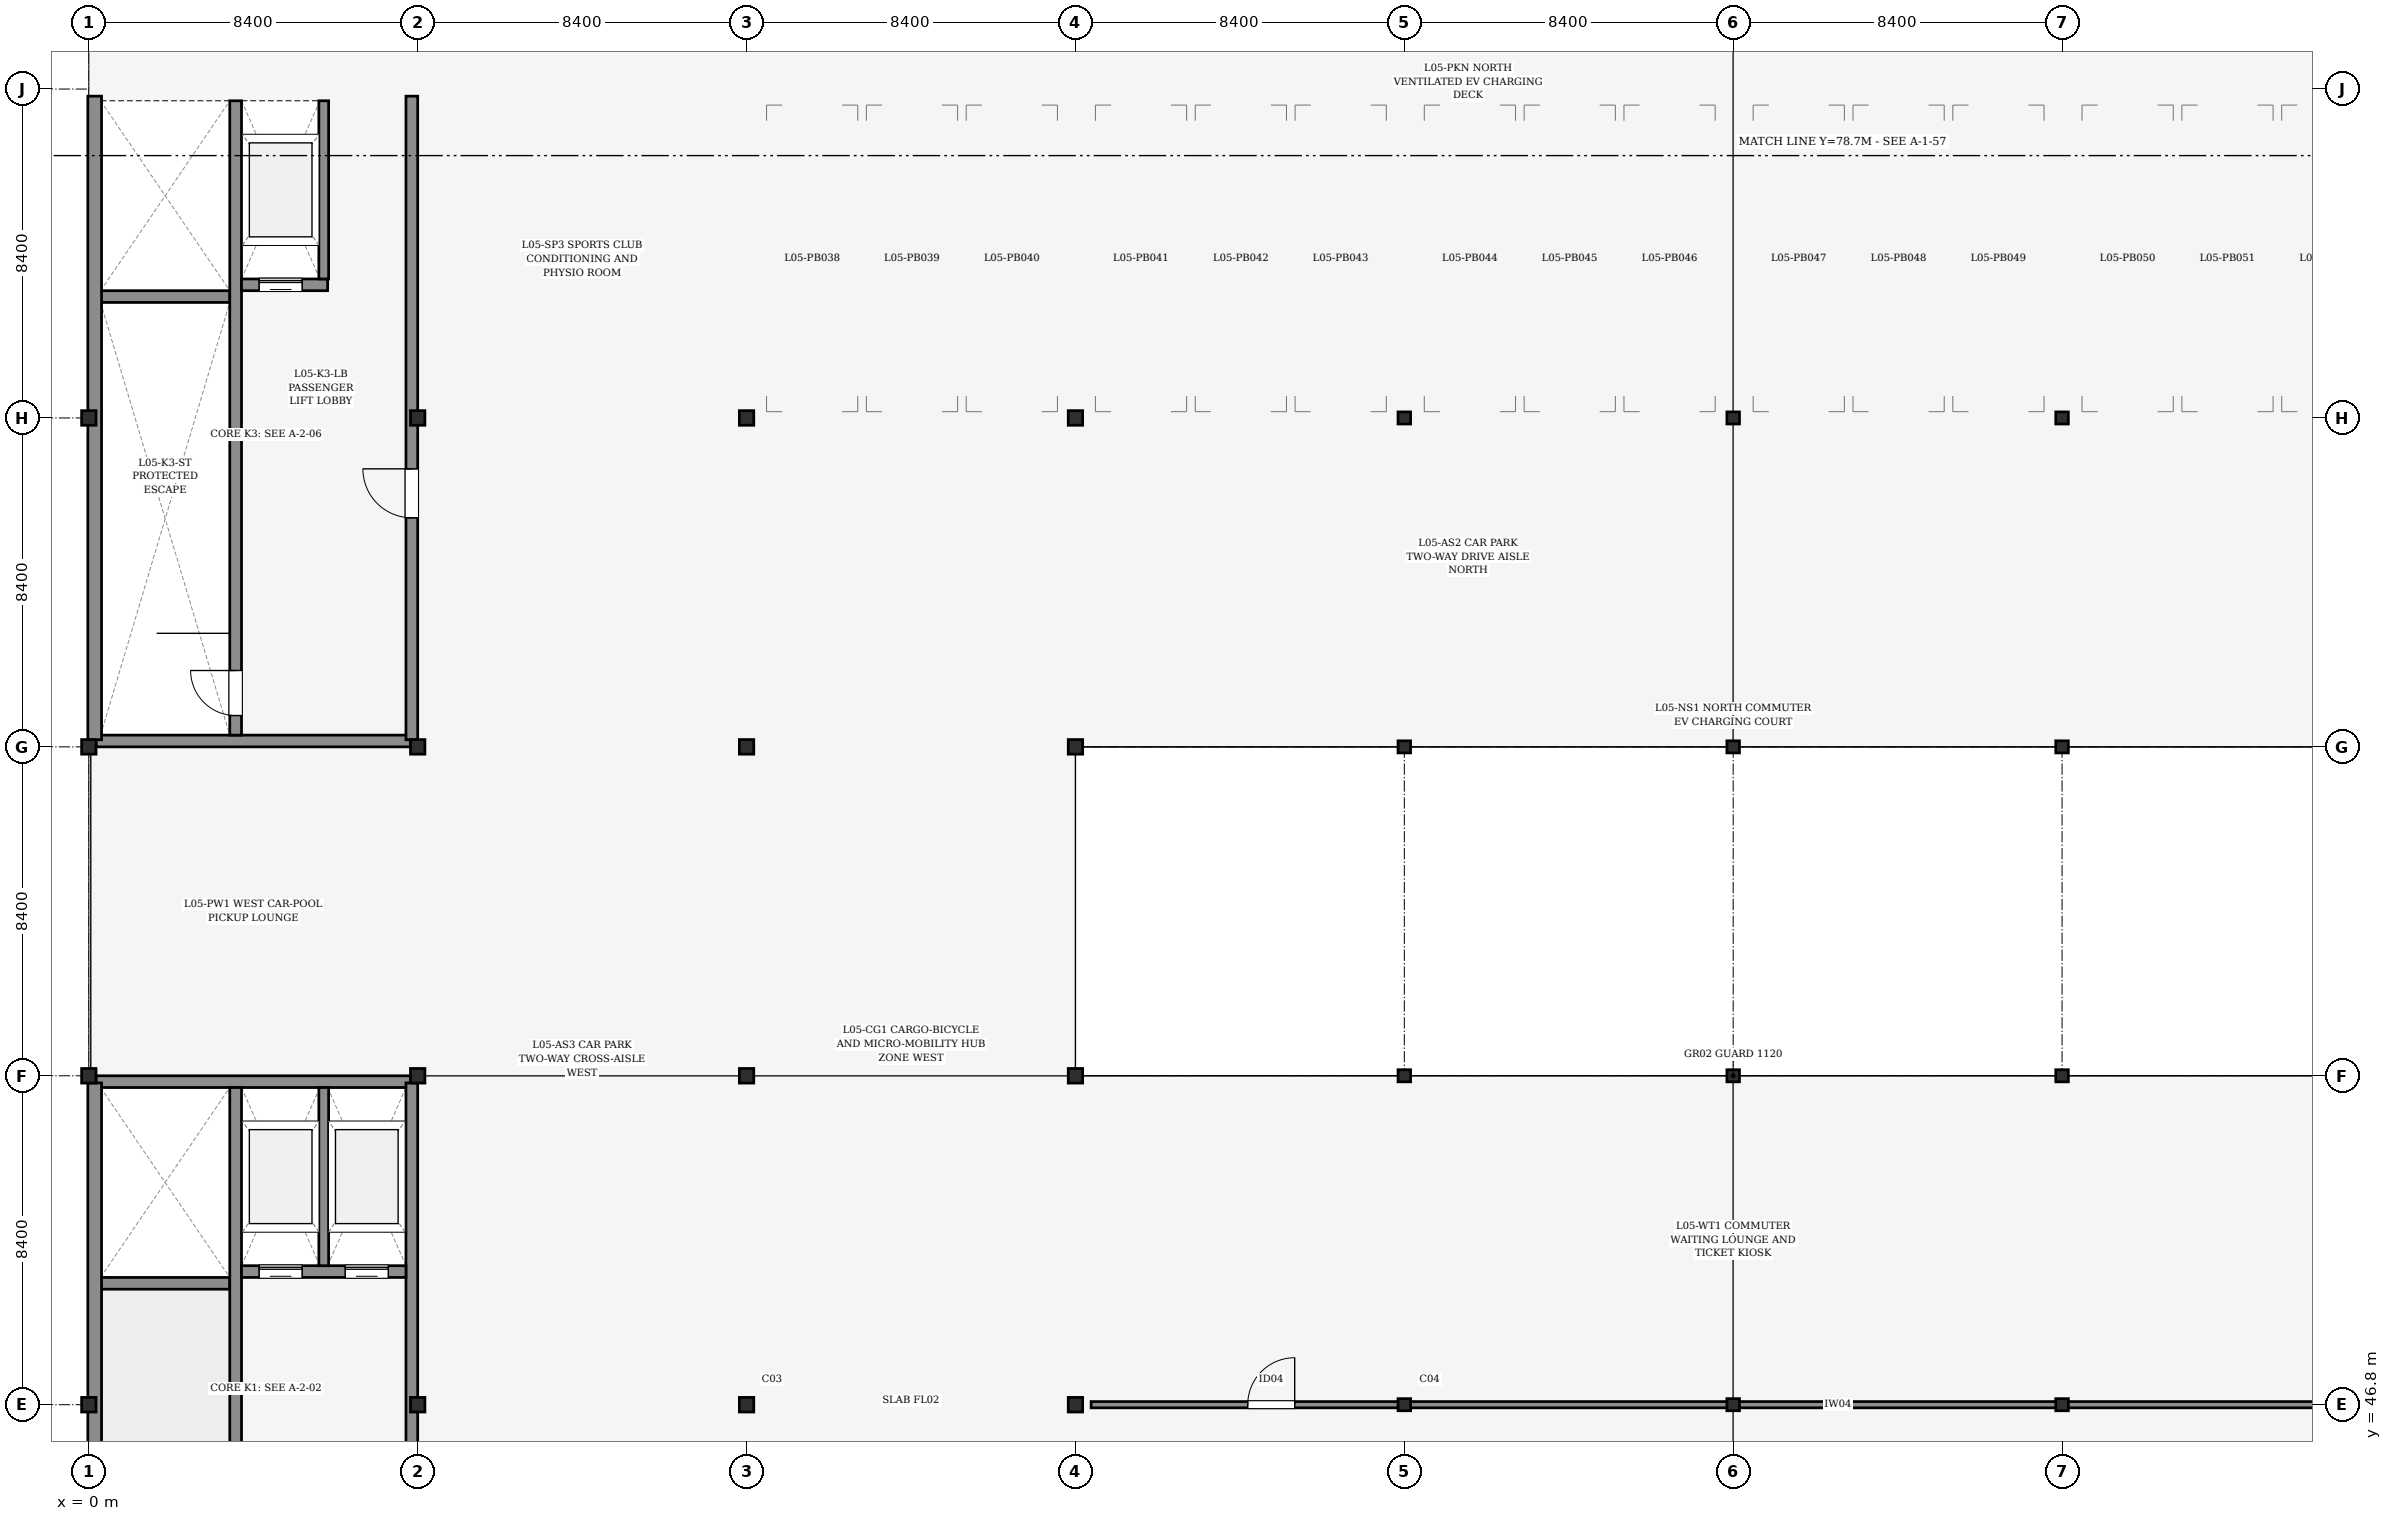
"""IFC4 building model, lengths in metres.
Left out: names, types, materials, properties, quantities, classifications, styles, units other than length and angle.
Written with IfcOpenShell. Run it as: python <this file> out.ifc"""

import sys

from ifc_helpers import new_model, si_unit, direction, frame, frame_2d, origin, origin_2d, place, context, subcontext, project, spatial, rectangle, i_section, extrude, element, fill, save


model = new_model("IFC4")
c1 = context("Model", 3, precision=1e-05, world=origin(), true_north=direction((0.0, 1.0)))
c2 = subcontext(c1, "Body", "Model", "MODEL_VIEW")
j1 = project(units=[si_unit("LENGTHUNIT", "METRE"), si_unit("PLANEANGLEUNIT", "RADIAN")], contexts=[c1])
p1 = place(None, origin())
s1 = spatial("IfcSite", under=j1, at=p1, CompositionType="ELEMENT")
p2 = place(p1, origin())
s2 = spatial("IfcBuilding", under=s1, at=p2, CompositionType="ELEMENT")
p3 = place(p2, frame((0.0, 0.0, 19.8)))
s3 = spatial("IfcBuildingStorey", under=s2, at=p3, CompositionType="ELEMENT", Elevation=19.8)
for number, where, z_axis, x_axis in (
    (1, (0.0, 46.8, 0.0), (0.0, 0.0, 1.0), (1.0, 0.0, 0.0)),
    (2, (0.0, 55.2, 0.0), (0.0, 0.0, 1.0), (1.0, 0.0, 0.0)),
    (3, (0.0, 63.6, 0.0), (0.0, 0.0, 1.0), (1.0, 0.0, 0.0)),
    (4, (0.0, 72.0, 0.0), (0.0, 0.0, 1.0), (1.0, 0.0, 0.0)),
    (5, (0.0, 80.4, 0.0), (0.0, 0.0, 1.0), (1.0, 0.0, 0.0)),
    (6, (8.4, 46.8, 0.0), (0.0, 0.0, 1.0), (1.0, 0.0, 0.0)),
    (7, (8.4, 55.2, 0.0), (0.0, 0.0, 1.0), (1.0, 0.0, 0.0)),
    (8, (8.4, 63.6, 0.0), (0.0, 0.0, 1.0), (1.0, 0.0, 0.0)),
    (9, (8.4, 72.0, 0.0), (0.0, 0.0, 1.0), (1.0, 0.0, 0.0)),
    (10, (8.4, 80.4, 0.0), (0.0, 0.0, 1.0), (1.0, 0.0, 0.0)),
    (11, (16.8, 46.8, 0.0), (0.0, 0.0, 1.0), (1.0, 0.0, 0.0)),
    (12, (16.8, 55.2, 0.0), (0.0, 0.0, 1.0), (1.0, 0.0, 0.0)),
    (13, (16.8, 63.6, 0.0), (0.0, 0.0, 1.0), (1.0, 0.0, 0.0)),
    (14, (16.8, 72.0, 0.0), (0.0, 0.0, 1.0), (1.0, 0.0, 0.0)),
    (15, (16.8, 80.4, 0.0), (0.0, 0.0, 1.0), (1.0, 0.0, 0.0)),
    (16, (25.2, 46.8, 0.0), (0.0, 0.0, 1.0), (1.0, 0.0, 0.0)),
    (17, (25.2, 55.2, 0.0), (0.0, 0.0, 1.0), (1.0, 0.0, 0.0)),
    (18, (25.2, 63.6, 0.0), (0.0, 0.0, 1.0), (1.0, 0.0, 0.0)),
    (19, (25.2, 72.0, 0.0), (0.0, 0.0, 1.0), (1.0, 0.0, 0.0)),
    (20, (25.2, 80.4, 0.0), (0.0, 0.0, 1.0), (1.0, 0.0, 0.0)),
):
    element("IfcColumn", number, at=place(p3, frame(where, z_axis=z_axis, x_axis=x_axis)), inside=s3, PredefinedType="COLUMN", context=c2, shape_type="SweptSolid", body=[
        extrude(i_section(OverallWidth=0.373, OverallDepth=0.368, WebThickness=0.014, FlangeThickness=0.024, FilletRadius=0.015, at=origin_2d()), origin(), (0.0, 0.0, 1.0), 3.6),
    ])
for number, where, z_axis, x_axis in (
    (21, (33.6, 46.8, 0.0), (0.0, 0.0, 1.0), (1.0, 0.0, 0.0)),
    (22, (33.6, 55.2, 0.0), (0.0, 0.0, 1.0), (1.0, 0.0, 0.0)),
    (23, (33.6, 63.6, 0.0), (0.0, 0.0, 1.0), (1.0, 0.0, 0.0)),
    (24, (33.6, 72.0, 0.0), (0.0, 0.0, 1.0), (1.0, 0.0, 0.0)),
    (25, (33.6, 80.4, 0.0), (0.0, 0.0, 1.0), (1.0, 0.0, 0.0)),
    (26, (42.0, 46.8, 0.0), (0.0, 0.0, 1.0), (1.0, 0.0, 0.0)),
    (27, (42.0, 55.2, 0.0), (0.0, 0.0, 1.0), (1.0, 0.0, 0.0)),
    (28, (42.0, 63.6, 0.0), (0.0, 0.0, 1.0), (1.0, 0.0, 0.0)),
    (29, (42.0, 72.0, 0.0), (0.0, 0.0, 1.0), (1.0, 0.0, 0.0)),
    (30, (42.0, 80.4, 0.0), (0.0, 0.0, 1.0), (1.0, 0.0, 0.0)),
    (31, (50.4, 46.8, 0.0), (0.0, 0.0, 1.0), (1.0, 0.0, 0.0)),
    (32, (50.4, 55.2, 0.0), (0.0, 0.0, 1.0), (1.0, 0.0, 0.0)),
    (33, (50.4, 63.6, 0.0), (0.0, 0.0, 1.0), (1.0, 0.0, 0.0)),
    (34, (50.4, 72.0, 0.0), (0.0, 0.0, 1.0), (1.0, 0.0, 0.0)),
    (35, (50.4, 80.4, 0.0), (0.0, 0.0, 1.0), (1.0, 0.0, 0.0)),
):
    element("IfcColumn", number, at=place(p3, frame(where, z_axis=z_axis, x_axis=x_axis)), inside=s3, PredefinedType="COLUMN", context=c2, shape_type="SweptSolid", body=[
        extrude(i_section(OverallWidth=0.309, OverallDepth=0.321, WebThickness=0.014, FlangeThickness=0.022, FilletRadius=0.015, at=origin_2d()), origin(), (0.0, 0.0, 1.0), 3.6),
    ])
p4 = place(p3, frame((0.185, 55.05, 0.0), z_axis=(0.0, 0.0, 1.0), x_axis=(1.0, 0.0, 0.0)))
e36 = element("IfcWall", 36, at=p4, inside=s3, PredefinedType="SHEAR", context=c2, shape_type="SweptSolid", body=[
    extrude(rectangle(XDim=8.031, YDim=0.3, at=frame_2d((4.016, 0.0))), origin(), (0.0, 0.0, 1.0), 3.38),
])
p5 = place(p3, frame((0.3, 49.9, 0.0), z_axis=(0.0, 0.0, 1.0), x_axis=(1.0, 0.0, 0.0)))
e37 = element("IfcWall", 37, at=p5, inside=s3, PredefinedType="SHEAR", context=c2, shape_type="SweptSolid", body=[
    extrude(rectangle(XDim=3.3, YDim=0.3, at=frame_2d((1.65, 0.0))), origin(), (0.0, 0.0, 1.0), 3.38),
])
p6 = place(p3, frame((0.15, 38.582, 0.0), z_axis=(0.0, 0.0, 1.0), x_axis=(0.0, 1.0, 0.0)))
e38 = element("IfcWall", 38, at=p6, inside=s3, PredefinedType="SHEAR", context=c2, shape_type="SweptSolid", body=[
    extrude(rectangle(XDim=16.436, YDim=0.35, at=frame_2d((8.218, 0.0))), origin(), (0.0, 0.0, 1.0), 3.38),
])
p7 = place(p3, frame((8.25, 38.582, 0.0), z_axis=(0.0, 0.0, 1.0), x_axis=(0.0, 1.0, 0.0)))
e39 = element("IfcWall", 39, at=p7, inside=s3, PredefinedType="SHEAR", context=c2, shape_type="SweptSolid", body=[
    extrude(rectangle(XDim=16.436, YDim=0.3, at=frame_2d((8.218, 0.0))), origin(), (0.0, 0.0, 1.0), 3.38),
])
p8 = place(p7, frame((5.668, 0.0, 0.0)))
e40 = element("IfcOpeningElement", 40, at=p8, cuts=e39, PredefinedType="OPENING", context=c2, shape_type="SweptSolid", body=[
    extrude(rectangle(XDim=1.3, YDim=2.2, at=frame_2d((0.65, 1.1))), frame((0.0, 0.16, 0.0), z_axis=(0.0, -1.0, 0.0), x_axis=(1.0, 0.0, 0.0)), (0.0, 0.0, 1.0), 0.32),
])
p9 = place(p3, frame((3.75, 38.7, 0.0), z_axis=(0.0, 0.0, 1.0), x_axis=(0.0, 1.0, 0.0)))
e41 = element("IfcWall", 41, at=p9, inside=s3, PredefinedType="SHEAR", context=c2, shape_type="SweptSolid", body=[
    extrude(rectangle(XDim=16.2, YDim=0.3, at=frame_2d((8.1, 0.0))), origin(), (0.0, 0.0, 1.0), 3.38),
])
p10 = place(p9, frame((0.5, 0.0, 0.0)))
e42 = element("IfcOpeningElement", 42, at=p10, cuts=e41, PredefinedType="OPENING", context=c2, shape_type="SweptSolid", body=[
    extrude(rectangle(XDim=1.15, YDim=2.15, at=frame_2d((0.575, 1.075))), frame((0.0, 0.16, 0.0), z_axis=(0.0, -1.0, 0.0), x_axis=(1.0, 0.0, 0.0)), (0.0, 0.0, 1.0), 0.32),
])
p11 = place(p3, frame((3.9, 50.2, 0.0), z_axis=(0.0, 0.0, 1.0), x_axis=(1.0, 0.0, 0.0)))
e43 = element("IfcWall", 43, at=p11, inside=s3, PredefinedType="SHEAR", context=c2, shape_type="SweptSolid", body=[
    extrude(rectangle(XDim=4.2, YDim=0.3, at=frame_2d((2.1, 0.0))), origin(), (0.0, 0.0, 1.0), 3.38),
])
p12 = place(p11, frame((0.45, 0.0, 0.0)))
e44 = element("IfcOpeningElement", 44, at=p12, cuts=e43, PredefinedType="OPENING", context=c2, shape_type="SweptSolid", body=[
    extrude(rectangle(XDim=1.1, YDim=2.2, at=frame_2d((0.55, 1.1))), frame((0.0, 0.16, 0.0), z_axis=(0.0, -1.0, 0.0), x_axis=(1.0, 0.0, 0.0)), (0.0, 0.0, 1.0), 0.32),
])
p13 = place(p11, frame((2.65, 0.0, 0.0)))
e45 = element("IfcOpeningElement", 45, at=p13, cuts=e43, PredefinedType="OPENING", context=c2, shape_type="SweptSolid", body=[
    extrude(rectangle(XDim=1.1, YDim=2.2, at=frame_2d((0.55, 1.1))), frame((0.0, 0.16, 0.0), z_axis=(0.0, -1.0, 0.0), x_axis=(1.0, 0.0, 0.0)), (0.0, 0.0, 1.0), 0.32),
])
p14 = place(p3, frame((6.0, 50.35, 0.0), z_axis=(0.0, 0.0, 1.0), x_axis=(0.0, 1.0, 0.0)))
e46 = element("IfcWall", 46, at=p14, inside=s3, PredefinedType="PARTITIONING", context=c2, shape_type="SweptSolid", body=[
    extrude(rectangle(XDim=4.55, YDim=0.25, at=frame_2d((2.275, 0.0))), origin(), (0.0, 0.0, 1.0), 2.425),
])
for number, where, z_axis, x_axis in (
    (47, (0.185, 63.75, 0.0), (0.0, 0.0, 1.0), (1.0, 0.0, 0.0)),
    (48, (0.185, 80.25, 0.0), (0.0, 0.0, 1.0), (1.0, 0.0, 0.0)),
):
    element("IfcWall", number, at=place(p3, frame(where, z_axis=z_axis, x_axis=x_axis)), inside=s3, PredefinedType="SHEAR", context=c2, shape_type="SweptSolid", body=[
        extrude(rectangle(XDim=8.031, YDim=0.3, at=frame_2d((4.016, 0.0))), origin(), (0.0, 0.0, 1.0), 3.38),
    ])
p15 = place(p3, frame((0.3, 75.1, 0.0), z_axis=(0.0, 0.0, 1.0), x_axis=(1.0, 0.0, 0.0)))
e49 = element("IfcWall", 49, at=p15, inside=s3, PredefinedType="SHEAR", context=c2, shape_type="SweptSolid", body=[
    extrude(rectangle(XDim=3.3, YDim=0.3, at=frame_2d((1.65, 0.0))), origin(), (0.0, 0.0, 1.0), 3.38),
])
p16 = place(p3, frame((0.15, 63.782, 0.0), z_axis=(0.0, 0.0, 1.0), x_axis=(0.0, 1.0, 0.0)))
e50 = element("IfcWall", 50, at=p16, inside=s3, PredefinedType="SHEAR", context=c2, shape_type="SweptSolid", body=[
    extrude(rectangle(XDim=16.436, YDim=0.35, at=frame_2d((8.218, 0.0))), origin(), (0.0, 0.0, 1.0), 3.38),
])
p17 = place(p3, frame((8.25, 63.782, 0.0), z_axis=(0.0, 0.0, 1.0), x_axis=(0.0, 1.0, 0.0)))
e51 = element("IfcWall", 51, at=p17, inside=s3, PredefinedType="SHEAR", context=c2, shape_type="SweptSolid", body=[
    extrude(rectangle(XDim=16.436, YDim=0.3, at=frame_2d((8.218, 0.0))), origin(), (0.0, 0.0, 1.0), 3.38),
])
p18 = place(p17, frame((5.668, 0.0, 0.0)))
e52 = element("IfcOpeningElement", 52, at=p18, cuts=e51, PredefinedType="OPENING", context=c2, shape_type="SweptSolid", body=[
    extrude(rectangle(XDim=1.25, YDim=2.15, at=frame_2d((0.625, 1.075))), frame((0.0, 0.16, 0.0), z_axis=(0.0, -1.0, 0.0), x_axis=(1.0, 0.0, 0.0)), (0.0, 0.0, 1.0), 0.32),
])
p19 = place(p3, frame((3.75, 63.9, 0.0), z_axis=(0.0, 0.0, 1.0), x_axis=(0.0, 1.0, 0.0)))
e53 = element("IfcWall", 53, at=p19, inside=s3, PredefinedType="SHEAR", context=c2, shape_type="SweptSolid", body=[
    extrude(rectangle(XDim=16.2, YDim=0.3, at=frame_2d((8.1, 0.0))), origin(), (0.0, 0.0, 1.0), 3.38),
])
p20 = place(p19, frame((0.5, 0.0, 0.0)))
e54 = element("IfcOpeningElement", 54, at=p20, cuts=e53, PredefinedType="OPENING", context=c2, shape_type="SweptSolid", body=[
    extrude(rectangle(XDim=1.15, YDim=2.15, at=frame_2d((0.575, 1.075))), frame((0.0, 0.16, 0.0), z_axis=(0.0, -1.0, 0.0), x_axis=(1.0, 0.0, 0.0)), (0.0, 0.0, 1.0), 0.32),
])
p21 = place(p3, frame((3.9, 75.4, 0.0), z_axis=(0.0, 0.0, 1.0), x_axis=(1.0, 0.0, 0.0)))
e55 = element("IfcWall", 55, at=p21, inside=s3, PredefinedType="SHEAR", context=c2, shape_type="SweptSolid", body=[
    extrude(rectangle(XDim=2.2, YDim=0.3, at=frame_2d((1.1, 0.0))), origin(), (0.0, 0.0, 1.0), 3.38),
])
p22 = place(p21, frame((0.45, 0.0, 0.0)))
e56 = element("IfcOpeningElement", 56, at=p22, cuts=e55, PredefinedType="OPENING", context=c2, shape_type="SweptSolid", body=[
    extrude(rectangle(XDim=1.1, YDim=2.2, at=frame_2d((0.55, 1.1))), frame((0.0, 0.16, 0.0), z_axis=(0.0, -1.0, 0.0), x_axis=(1.0, 0.0, 0.0)), (0.0, 0.0, 1.0), 0.32),
])
p23 = place(p3, frame((6.0, 75.55, 0.0), z_axis=(0.0, 0.0, 1.0), x_axis=(0.0, 1.0, 0.0)))
e57 = element("IfcWall", 57, at=p23, inside=s3, PredefinedType="PARTITIONING", context=c2, shape_type="SweptSolid", body=[
    extrude(rectangle(XDim=4.55, YDim=0.25, at=frame_2d((2.275, 0.0))), origin(), (0.0, 0.0, 1.0), 2.425),
])
p24 = place(p3, frame((25.6, 46.8, 0.0), z_axis=(0.0, 0.0, 1.0), x_axis=(1.0, 0.0, 0.0)))
e58 = element("IfcWall", 58, at=p24, inside=s3, PredefinedType="PARTITIONING", context=c2, shape_type="SweptSolid", body=[
    extrude(rectangle(XDim=32.8, YDim=0.16, at=frame_2d((16.4, 0.0))), origin(), (0.0, 0.0, 1.0), 2.425),
])
p25 = place(p24, frame((4.0, 0.0, 0.0)))
e59 = element("IfcOpeningElement", 59, at=p25, cuts=e58, PredefinedType="OPENING", context=c2, shape_type="SweptSolid", body=[
    extrude(rectangle(XDim=1.2, YDim=2.15, at=frame_2d((0.6, 1.075))), frame((0.0, 0.09, 0.0), z_axis=(0.0, -1.0, 0.0), x_axis=(1.0, 0.0, 0.0)), (0.0, 0.0, 1.0), 0.18),
])
p26 = place(p12, origin())
e60 = element("IfcDoor", 60, at=p26, inside=s3, OperationType="SLIDING_TO_LEFT", PredefinedType="DOOR", context=c2, shape_type="SweptSolid", body=[
    extrude(rectangle(XDim=1.1, YDim=2.2, at=frame_2d((0.55, 1.1))), frame((0.0, 0.025, 0.0), z_axis=(0.0, -1.0, 0.0), x_axis=(1.0, 0.0, 0.0)), (0.0, 0.0, 1.0), 0.05),
])
fill(e44, e60)
p27 = place(p13, origin())
e61 = element("IfcDoor", 61, at=p27, inside=s3, OperationType="SLIDING_TO_LEFT", PredefinedType="DOOR", context=c2, shape_type="SweptSolid", body=[
    extrude(rectangle(XDim=1.1, YDim=2.2, at=frame_2d((0.55, 1.1))), frame((0.0, 0.025, 0.0), z_axis=(0.0, -1.0, 0.0), x_axis=(1.0, 0.0, 0.0)), (0.0, 0.0, 1.0), 0.05),
])
fill(e45, e61)
p28 = place(p18, origin())
e62 = element("IfcDoor", 62, at=p28, inside=s3, OperationType="SINGLE_SWING_RIGHT", PredefinedType="DOOR", context=c2, shape_type="SweptSolid", body=[
    extrude(rectangle(XDim=1.25, YDim=2.15, at=frame_2d((0.625, 1.075))), frame((0.0, 0.025, 0.0), z_axis=(0.0, -1.0, 0.0), x_axis=(1.0, 0.0, 0.0)), (0.0, 0.0, 1.0), 0.05),
])
fill(e52, e62)
p29 = place(p20, frame((1.15, 0.0, 0.0), z_axis=(0.0, 0.0, 1.0), x_axis=(-1.0, 0.0, 0.0)))
e63 = element("IfcDoor", 63, at=p29, inside=s3, OperationType="SINGLE_SWING_LEFT", PredefinedType="DOOR", context=c2, shape_type="SweptSolid", body=[
    extrude(rectangle(XDim=1.15, YDim=2.15, at=frame_2d((0.575, 1.075))), frame((0.0, 0.025, 0.0), z_axis=(0.0, -1.0, 0.0), x_axis=(1.0, 0.0, 0.0)), (0.0, 0.0, 1.0), 0.05),
])
fill(e54, e63)
p30 = place(p22, origin())
e64 = element("IfcDoor", 64, at=p30, inside=s3, OperationType="SLIDING_TO_LEFT", PredefinedType="DOOR", context=c2, shape_type="SweptSolid", body=[
    extrude(rectangle(XDim=1.1, YDim=2.2, at=frame_2d((0.55, 1.1))), frame((0.0, 0.025, 0.0), z_axis=(0.0, -1.0, 0.0), x_axis=(1.0, 0.0, 0.0)), (0.0, 0.0, 1.0), 0.05),
])
fill(e56, e64)
p31 = place(p25, origin())
e65 = element("IfcDoor", 65, at=p31, inside=s3, OperationType="SINGLE_SWING_RIGHT", PredefinedType="DOOR", context=c2, shape_type="SweptSolid", body=[
    extrude(rectangle(XDim=1.2, YDim=2.15, at=frame_2d((0.6, 1.075))), frame((0.0, 0.025, 0.0), z_axis=(0.0, -1.0, 0.0), x_axis=(1.0, 0.0, 0.0)), (0.0, 0.0, 1.0), 0.05),
])
fill(e59, e65)
save(model, sys.argv[1])
